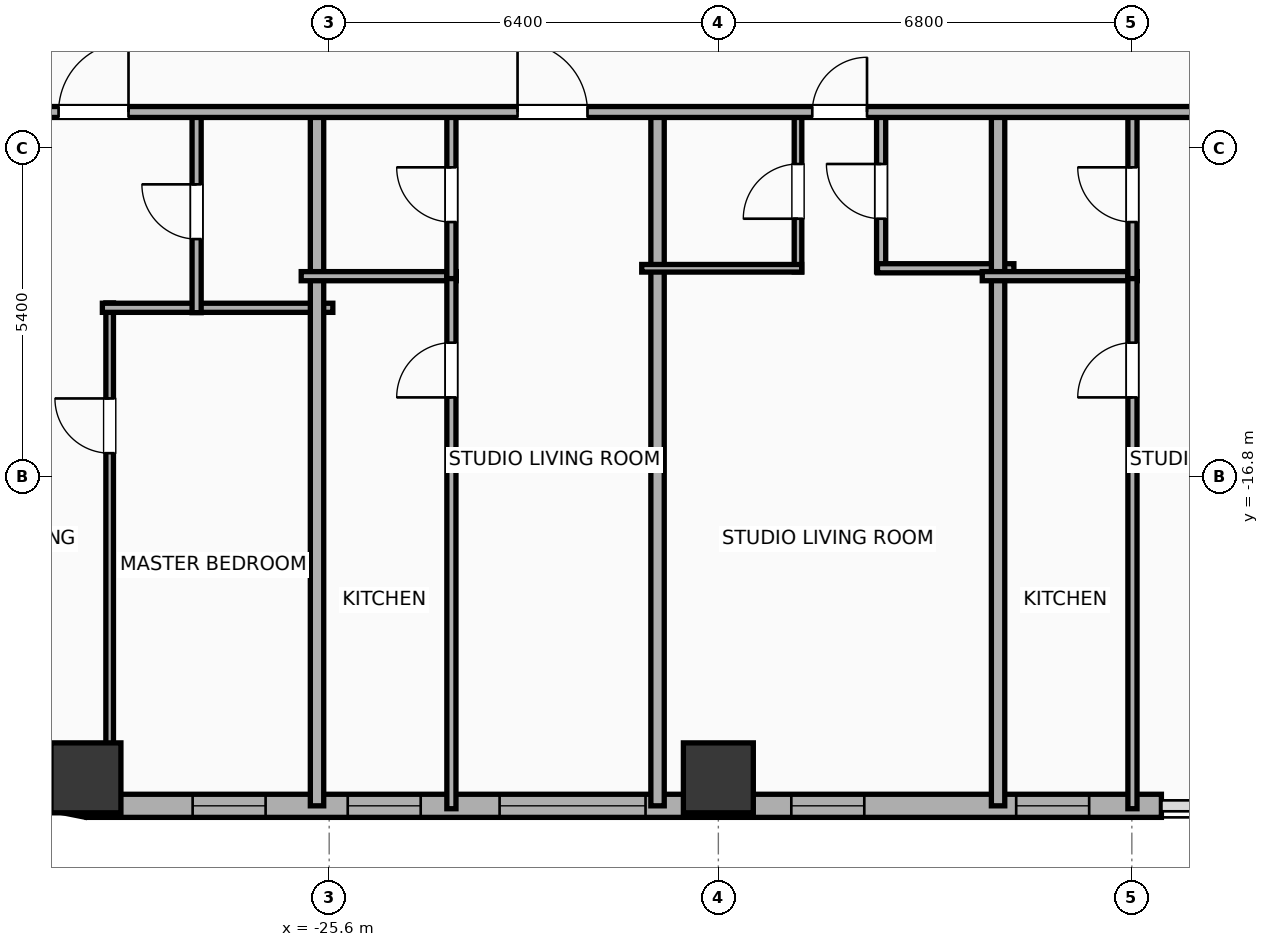
"""IFC4 building model, lengths in metres.
Left out: names, types, materials, properties, quantities, classifications, styles, units other than length and angle.
Written with IfcOpenShell. Run it as: python <this file> out.ifc"""

import sys

from ifc_helpers import new_model, si_unit, direction, frame, frame_2d, origin, origin_2d, place, context, subcontext, project, spatial, rectangle, hollow_rectangle, extrude, element, fill, save


model = new_model("IFC4")
c1 = context("Model", 3, precision=1e-05, world=origin(), true_north=direction((0.0, 1.0)))
c2 = subcontext(c1, "Body", "Model", "MODEL_VIEW")
j1 = project(units=[si_unit("LENGTHUNIT", "METRE"), si_unit("PLANEANGLEUNIT", "RADIAN")], contexts=[c1])
p1 = place(None, origin())
s1 = spatial("IfcSite", under=j1, at=p1, CompositionType="ELEMENT")
p2 = place(p1, origin())
s2 = spatial("IfcBuilding", under=s1, at=p2, CompositionType="ELEMENT")
p3 = place(p2, frame((0.0, 0.0, 61.1)))
s3 = spatial("IfcBuildingStorey", under=s2, at=p3, CompositionType="ELEMENT", Elevation=61.1)
for number, where, z_axis, x_axis in (
    (1, (-29.6, -21.75, 0.0), (0.0, 0.0, 1.0), (1.0, 0.0, 0.0)),
    (2, (-19.2, -21.75, 0.0), (0.0, 0.0, 1.0), (1.0, 0.0, 0.0)),
):
    element("IfcColumn", number, at=place(p3, frame(where, z_axis=z_axis, x_axis=x_axis)), inside=s3, PredefinedType="COLUMN", context=c2, shape_type="SweptSolid", body=[
        extrude(hollow_rectangle(XDim=1.15, YDim=1.15, WallThickness=0.04, at=origin_2d()), origin(), (0.0, 0.0, 1.0), 3.9),
    ])
p4 = place(p3, frame((-11.914, -22.21, 0.0), z_axis=(0.0, 0.0, 1.0), x_axis=(-1.0, 0.0, 0.0)))
e3 = element("IfcWall", 3, at=p4, inside=s3, PredefinedType="ELEMENTEDWALL", context=c2, shape_type="SweptSolid", body=[
    extrude(rectangle(XDim=17.667, YDim=0.38, at=frame_2d((8.833, 0.0))), origin(), (0.0, 0.0, 1.0), 3.65),
])
p5 = place(p4, frame((8.484, 0.0, 0.75)))
e4 = element("IfcOpeningElement", 4, at=p5, cuts=e3, PredefinedType="OPENING", context=c2, shape_type="SweptSolid", body=[
    extrude(rectangle(XDim=2.4, YDim=2.1, at=frame_2d((1.2, 1.05))), frame((0.0, 0.2, 0.0), z_axis=(0.0, -1.0, 0.0), x_axis=(1.0, 0.0, 0.0)), (0.0, 0.0, 1.0), 0.4),
])
p6 = place(p4, frame((14.732, 0.0, 0.75)))
e5 = element("IfcOpeningElement", 5, at=p6, cuts=e3, PredefinedType="OPENING", context=c2, shape_type="SweptSolid", body=[
    extrude(rectangle(XDim=1.2, YDim=2.05, at=frame_2d((0.6, 1.025))), frame((0.0, 0.2, 0.0), z_axis=(0.0, -1.0, 0.0), x_axis=(1.0, 0.0, 0.0)), (0.0, 0.0, 1.0), 0.4),
])
p7 = place(p4, frame((12.181, 0.0, 0.75)))
e6 = element("IfcOpeningElement", 6, at=p7, cuts=e3, PredefinedType="OPENING", context=c2, shape_type="SweptSolid", body=[
    extrude(rectangle(XDim=1.2, YDim=2.05, at=frame_2d((0.6, 1.025))), frame((0.0, 0.2, 0.0), z_axis=(0.0, -1.0, 0.0), x_axis=(1.0, 0.0, 0.0)), (0.0, 0.0, 1.0), 0.4),
])
p8 = place(p4, frame((4.886, 0.0, 0.75)))
e7 = element("IfcOpeningElement", 7, at=p8, cuts=e3, PredefinedType="OPENING", context=c2, shape_type="SweptSolid", body=[
    extrude(rectangle(XDim=1.2, YDim=2.05, at=frame_2d((0.6, 1.025))), frame((0.0, 0.2, 0.0), z_axis=(0.0, -1.0, 0.0), x_axis=(1.0, 0.0, 0.0)), (0.0, 0.0, 1.0), 0.4),
])
p9 = place(p4, frame((1.188, 0.0, 0.75)))
e8 = element("IfcOpeningElement", 8, at=p9, cuts=e3, PredefinedType="OPENING", context=c2, shape_type="SweptSolid", body=[
    extrude(rectangle(XDim=1.2, YDim=2.05, at=frame_2d((0.6, 1.025))), frame((0.0, 0.2, 0.0), z_axis=(0.0, -1.0, 0.0), x_axis=(1.0, 0.0, 0.0)), (0.0, 0.0, 1.0), 0.4),
])
p10 = place(p3, frame((-29.581, -22.21, 0.0), z_axis=(0.0, 0.0, 1.0), x_axis=(-0.980786132421, 0.195086038585, 0.0)))
e9 = element("IfcWall", 9, at=p10, inside=s3, PredefinedType="ELEMENTEDWALL", context=c2, shape_type="SweptSolid", body=[
    extrude(rectangle(XDim=1.504, YDim=0.38, at=frame_2d((0.752, 0.0))), origin(), (0.0, 0.0, 1.0), 3.65),
])
p11 = place(p3, frame((-29.21, -22.36, 0.0), z_axis=(0.0, 0.0, 1.0), x_axis=(0.0, 1.0, 0.0)))
e10 = element("IfcWall", 10, at=p11, inside=s3, PredefinedType="PARTITIONING", context=c2, shape_type="SweptSolid", body=[
    extrude(rectangle(XDim=8.42, YDim=0.125, at=frame_2d((4.21, 0.0))), origin(), (0.0, 0.0, 1.0), 3.65),
])
p12 = place(p11, frame((5.949, 0.0, 0.0)))
e11 = element("IfcOpeningElement", 11, at=p12, cuts=e10, PredefinedType="OPENING", context=c2, shape_type="SweptSolid", body=[
    extrude(rectangle(XDim=0.9, YDim=2.05, at=frame_2d((0.45, 1.025))), frame((0.0, 0.073, 0.0), z_axis=(0.0, -1.0, 0.0), x_axis=(1.0, 0.0, 0.0)), (0.0, 0.0, 1.0), 0.145),
])
p13 = place(p3, frame((-29.33, -14.02, 0.0), z_axis=(0.0, 0.0, 1.0), x_axis=(1.0, 0.0, 0.0)))
e12 = element("IfcWall", 12, at=p13, inside=s3, PredefinedType="PLUMBINGWALL", context=c2, shape_type="SweptSolid", body=[
    extrude(rectangle(XDim=3.79, YDim=0.15, at=frame_2d((1.895, 0.0))), origin(), (0.0, 0.0, 1.0), 3.65),
])
p14 = place(p3, frame((-27.78, -14.1, 0.0), z_axis=(0.0, 0.0, 1.0), x_axis=(0.0, 1.0, 0.0)))
e13 = element("IfcWall", 13, at=p14, inside=s3, PredefinedType="PLUMBINGWALL", context=c2, shape_type="SweptSolid", body=[
    extrude(rectangle(XDim=3.32, YDim=0.15, at=frame_2d((1.66, 0.0))), origin(), (0.0, 0.0, 1.0), 3.65),
])
p15 = place(p14, frame((1.21, 0.0, 0.0)))
e14 = element("IfcOpeningElement", 14, at=p15, cuts=e13, PredefinedType="OPENING", context=c2, shape_type="SweptSolid", body=[
    extrude(rectangle(XDim=0.9, YDim=2.05, at=frame_2d((0.45, 1.025))), frame((0.0, 0.085, 0.0), z_axis=(0.0, -1.0, 0.0), x_axis=(1.0, 0.0, 0.0)), (0.0, 0.0, 1.0), 0.17),
])
p16 = place(p3, frame((-25.8, -22.21, 0.0), z_axis=(0.0, 0.0, 1.0), x_axis=(0.0, 1.0, 0.0)))
e15 = element("IfcWall", 15, at=p16, inside=s3, PredefinedType="PARTITIONING", context=c2, shape_type="SweptSolid", body=[
    extrude(rectangle(XDim=11.49, YDim=0.22, at=frame_2d((5.745, 0.0))), origin(), (0.0, 0.0, 1.0), 3.65),
])
p17 = place(p3, frame((-26.06, -13.5, 0.0), z_axis=(0.0, 0.0, 1.0), x_axis=(1.0, 0.0, 0.0)))
e16 = element("IfcWall", 16, at=p17, inside=s3, PredefinedType="PLUMBINGWALL", context=c2, shape_type="SweptSolid", body=[
    extrude(rectangle(XDim=2.55, YDim=0.15, at=frame_2d((1.275, 0.0))), origin(), (0.0, 0.0, 1.0), 3.65),
])
p18 = place(p3, frame((-23.59, -22.258, 0.0), z_axis=(0.0, 0.0, 1.0), x_axis=(0.0, 1.0, 0.0)))
e17 = element("IfcWall", 17, at=p18, inside=s3, PredefinedType="PLUMBINGWALL", context=c2, shape_type="SweptSolid", body=[
    extrude(rectangle(XDim=8.798, YDim=0.15, at=frame_2d((4.399, 0.0))), origin(), (0.0, 0.0, 1.0), 3.65),
])
p19 = place(p18, frame((6.764, 0.0, 0.0)))
e18 = element("IfcOpeningElement", 18, at=p19, cuts=e17, PredefinedType="OPENING", context=c2, shape_type="SweptSolid", body=[
    extrude(rectangle(XDim=0.9, YDim=2.05, at=frame_2d((0.45, 1.025))), frame((0.0, 0.085, 0.0), z_axis=(0.0, -1.0, 0.0), x_axis=(1.0, 0.0, 0.0)), (0.0, 0.0, 1.0), 0.17),
])
p20 = place(p3, frame((-23.59, -13.54, 0.0), z_axis=(0.0, 0.0, 1.0), x_axis=(0.0, 1.0, 0.0)))
e19 = element("IfcWall", 19, at=p20, inside=s3, PredefinedType="PLUMBINGWALL", context=c2, shape_type="SweptSolid", body=[
    extrude(rectangle(XDim=2.76, YDim=0.15, at=frame_2d((1.38, 0.0))), origin(), (0.0, 0.0, 1.0), 3.65),
])
p21 = place(p20, frame((0.93, 0.0, 0.0)))
e20 = element("IfcOpeningElement", 20, at=p21, cuts=e19, PredefinedType="OPENING", context=c2, shape_type="SweptSolid", body=[
    extrude(rectangle(XDim=0.9, YDim=2.05, at=frame_2d((0.45, 1.025))), frame((0.0, 0.085, 0.0), z_axis=(0.0, -1.0, 0.0), x_axis=(1.0, 0.0, 0.0)), (0.0, 0.0, 1.0), 0.17),
])
p22 = place(p3, frame((-20.2, -22.21, 0.0), z_axis=(0.0, 0.0, 1.0), x_axis=(0.0, 1.0, 0.0)))
e21 = element("IfcWall", 21, at=p22, inside=s3, PredefinedType="PARTITIONING", context=c2, shape_type="SweptSolid", body=[
    extrude(rectangle(XDim=11.49, YDim=0.22, at=frame_2d((5.745, 0.0))), origin(), (0.0, 0.0, 1.0), 3.65),
])
p23 = place(p3, frame((-17.89, -13.43, 0.0), z_axis=(0.0, 0.0, 1.0), x_axis=(0.0, 1.0, 0.0)))
e22 = element("IfcWall", 22, at=p23, inside=s3, PredefinedType="PARTITIONING", context=c2, shape_type="SweptSolid", body=[
    extrude(rectangle(XDim=2.65, YDim=0.125, at=frame_2d((1.325, 0.0))), origin(), (0.0, 0.0, 1.0), 3.65),
])
p24 = place(p23, frame((0.875, 0.0, 0.0)))
e23 = element("IfcOpeningElement", 23, at=p24, cuts=e22, PredefinedType="OPENING", context=c2, shape_type="SweptSolid", body=[
    extrude(rectangle(XDim=0.9, YDim=2.05, at=frame_2d((0.45, 1.025))), frame((0.0, 0.073, 0.0), z_axis=(0.0, -1.0, 0.0), x_axis=(1.0, 0.0, 0.0)), (0.0, 0.0, 1.0), 0.145),
])
p25 = place(p3, frame((-16.523, -13.43, 0.0), z_axis=(0.0, 0.0, 1.0), x_axis=(0.0, 1.0, 0.0)))
e24 = element("IfcWall", 24, at=p25, inside=s3, PredefinedType="PLUMBINGWALL", context=c2, shape_type="SweptSolid", body=[
    extrude(rectangle(XDim=2.65, YDim=0.15, at=frame_2d((1.325, 0.0))), origin(), (0.0, 0.0, 1.0), 3.65),
])
p26 = place(p25, frame((0.875, 0.0, 0.0)))
e25 = element("IfcOpeningElement", 25, at=p26, cuts=e24, PredefinedType="OPENING", context=c2, shape_type="SweptSolid", body=[
    extrude(rectangle(XDim=0.9, YDim=2.05, at=frame_2d((0.45, 1.025))), frame((0.0, 0.085, 0.0), z_axis=(0.0, -1.0, 0.0), x_axis=(1.0, 0.0, 0.0)), (0.0, 0.0, 1.0), 0.17),
])
p27 = place(p3, frame((-20.46, -13.37, 0.0), z_axis=(0.0, 0.0, 1.0), x_axis=(1.0, 0.0, 0.0)))
e26 = element("IfcWall", 26, at=p27, inside=s3, PredefinedType="PARTITIONING", context=c2, shape_type="SweptSolid", body=[
    extrude(rectangle(XDim=2.63, YDim=0.125, at=frame_2d((1.315, 0.0))), origin(), (0.0, 0.0, 1.0), 3.65),
])
p28 = place(p3, frame((-16.583, -13.37, 0.0), z_axis=(0.0, 0.0, 1.0), x_axis=(1.0, 0.0, 0.0)))
e27 = element("IfcWall", 27, at=p28, inside=s3, PredefinedType="PLUMBINGWALL", context=c2, shape_type="SweptSolid", body=[
    extrude(rectangle(XDim=2.243, YDim=0.15, at=frame_2d((1.122, 0.0))), origin(), (0.0, 0.0, 1.0), 3.65),
])
p29 = place(p3, frame((-14.6, -22.21, 0.0), z_axis=(0.0, 0.0, 1.0), x_axis=(0.0, 1.0, 0.0)))
e28 = element("IfcWall", 28, at=p29, inside=s3, PredefinedType="PARTITIONING", context=c2, shape_type="SweptSolid", body=[
    extrude(rectangle(XDim=11.49, YDim=0.22, at=frame_2d((5.745, 0.0))), origin(), (0.0, 0.0, 1.0), 3.65),
])
p30 = place(p3, frame((-14.86, -13.5, 0.0), z_axis=(0.0, 0.0, 1.0), x_axis=(1.0, 0.0, 0.0)))
e29 = element("IfcWall", 29, at=p30, inside=s3, PredefinedType="PLUMBINGWALL", context=c2, shape_type="SweptSolid", body=[
    extrude(rectangle(XDim=2.55, YDim=0.15, at=frame_2d((1.275, 0.0))), origin(), (0.0, 0.0, 1.0), 3.65),
])
p31 = place(p3, frame((-12.39, -22.258, 0.0), z_axis=(0.0, 0.0, 1.0), x_axis=(0.0, 1.0, 0.0)))
e30 = element("IfcWall", 30, at=p31, inside=s3, PredefinedType="PLUMBINGWALL", context=c2, shape_type="SweptSolid", body=[
    extrude(rectangle(XDim=8.798, YDim=0.15, at=frame_2d((4.399, 0.0))), origin(), (0.0, 0.0, 1.0), 3.65),
])
p32 = place(p31, frame((6.764, 0.0, 0.0)))
e31 = element("IfcOpeningElement", 31, at=p32, cuts=e30, PredefinedType="OPENING", context=c2, shape_type="SweptSolid", body=[
    extrude(rectangle(XDim=0.9, YDim=2.05, at=frame_2d((0.45, 1.025))), frame((0.0, 0.085, 0.0), z_axis=(0.0, -1.0, 0.0), x_axis=(1.0, 0.0, 0.0)), (0.0, 0.0, 1.0), 0.17),
])
p33 = place(p3, frame((-12.39, -13.54, 0.0), z_axis=(0.0, 0.0, 1.0), x_axis=(0.0, 1.0, 0.0)))
e32 = element("IfcWall", 32, at=p33, inside=s3, PredefinedType="PLUMBINGWALL", context=c2, shape_type="SweptSolid", body=[
    extrude(rectangle(XDim=2.76, YDim=0.15, at=frame_2d((1.38, 0.0))), origin(), (0.0, 0.0, 1.0), 3.65),
])
p34 = place(p33, frame((0.93, 0.0, 0.0)))
e33 = element("IfcOpeningElement", 33, at=p34, cuts=e32, PredefinedType="OPENING", context=c2, shape_type="SweptSolid", body=[
    extrude(rectangle(XDim=0.9, YDim=2.05, at=frame_2d((0.45, 1.025))), frame((0.0, 0.085, 0.0), z_axis=(0.0, -1.0, 0.0), x_axis=(1.0, 0.0, 0.0)), (0.0, 0.0, 1.0), 0.17),
])
p35 = place(p3, frame((-33.41, -10.8, 0.0), z_axis=(0.0, 0.0, 1.0), x_axis=(1.0, 0.0, 0.0)))
e34 = element("IfcWall", 34, at=p35, inside=s3, PredefinedType="PARTITIONING", context=c2, shape_type="SweptSolid", body=[
    extrude(rectangle(XDim=59.62, YDim=0.18, at=frame_2d((29.81, 0.0))), origin(), (0.0, 0.0, 1.0), 3.65),
])
p36 = place(p35, frame((3.36, 0.0, 0.0)))
e35 = element("IfcOpeningElement", 35, at=p36, cuts=e34, PredefinedType="OPENING", context=c2, shape_type="SweptSolid", body=[
    extrude(rectangle(XDim=1.15, YDim=2.05, at=frame_2d((0.575, 1.025))), frame((0.0, 0.1, 0.0), z_axis=(0.0, -1.0, 0.0), x_axis=(1.0, 0.0, 0.0)), (0.0, 0.0, 1.0), 0.2),
])
p37 = place(p35, frame((10.908, 0.0, 0.0)))
e36 = element("IfcOpeningElement", 36, at=p37, cuts=e34, PredefinedType="OPENING", context=c2, shape_type="SweptSolid", body=[
    extrude(rectangle(XDim=1.15, YDim=2.05, at=frame_2d((0.575, 1.025))), frame((0.0, 0.1, 0.0), z_axis=(0.0, -1.0, 0.0), x_axis=(1.0, 0.0, 0.0)), (0.0, 0.0, 1.0), 0.2),
])
p38 = place(p35, frame((15.755, 0.0, 0.0)))
e37 = element("IfcOpeningElement", 37, at=p38, cuts=e34, PredefinedType="OPENING", context=c2, shape_type="SweptSolid", body=[
    extrude(rectangle(XDim=0.9, YDim=2.05, at=frame_2d((0.45, 1.025))), frame((0.0, 0.1, 0.0), z_axis=(0.0, -1.0, 0.0), x_axis=(1.0, 0.0, 0.0)), (0.0, 0.0, 1.0), 0.2),
])
p39 = place(p35, frame((22.11, 0.0, 0.0)))
e38 = element("IfcOpeningElement", 38, at=p39, cuts=e34, PredefinedType="OPENING", context=c2, shape_type="SweptSolid", body=[
    extrude(rectangle(XDim=1.15, YDim=2.05, at=frame_2d((0.575, 1.025))), frame((0.0, 0.1, 0.0), z_axis=(0.0, -1.0, 0.0), x_axis=(1.0, 0.0, 0.0)), (0.0, 0.0, 1.0), 0.2),
])
p40 = place(p35, frame((27.709, 0.0, 0.0)))
e39 = element("IfcOpeningElement", 39, at=p40, cuts=e34, PredefinedType="OPENING", context=c2, shape_type="SweptSolid", body=[
    extrude(rectangle(XDim=1.15, YDim=2.05, at=frame_2d((0.575, 1.025))), frame((0.0, 0.1, 0.0), z_axis=(0.0, -1.0, 0.0), x_axis=(1.0, 0.0, 0.0)), (0.0, 0.0, 1.0), 0.2),
])
p41 = place(p35, frame((33.349, 0.0, 0.0)))
e40 = element("IfcOpeningElement", 40, at=p41, cuts=e34, PredefinedType="OPENING", context=c2, shape_type="SweptSolid", body=[
    extrude(rectangle(XDim=1.15, YDim=2.05, at=frame_2d((0.575, 1.025))), frame((0.0, 0.1, 0.0), z_axis=(0.0, -1.0, 0.0), x_axis=(1.0, 0.0, 0.0)), (0.0, 0.0, 1.0), 0.2),
])
p42 = place(p35, frame((36.759, 0.0, 0.0)))
e41 = element("IfcOpeningElement", 41, at=p42, cuts=e34, PredefinedType="OPENING", context=c2, shape_type="SweptSolid", body=[
    extrude(rectangle(XDim=1.15, YDim=2.05, at=frame_2d((0.575, 1.025))), frame((0.0, 0.1, 0.0), z_axis=(0.0, -1.0, 0.0), x_axis=(1.0, 0.0, 0.0)), (0.0, 0.0, 1.0), 0.2),
])
p43 = place(p35, frame((43.752, 0.0, 0.0)))
e42 = element("IfcOpeningElement", 42, at=p43, cuts=e34, PredefinedType="OPENING", context=c2, shape_type="SweptSolid", body=[
    extrude(rectangle(XDim=0.9, YDim=2.05, at=frame_2d((0.45, 1.025))), frame((0.0, 0.1, 0.0), z_axis=(0.0, -1.0, 0.0), x_axis=(1.0, 0.0, 0.0)), (0.0, 0.0, 1.0), 0.2),
])
p44 = place(p35, frame((47.962, 0.0, 0.0)))
e43 = element("IfcOpeningElement", 43, at=p44, cuts=e34, PredefinedType="OPENING", context=c2, shape_type="SweptSolid", body=[
    extrude(rectangle(XDim=1.15, YDim=2.05, at=frame_2d((0.575, 1.025))), frame((0.0, 0.1, 0.0), z_axis=(0.0, -1.0, 0.0), x_axis=(1.0, 0.0, 0.0)), (0.0, 0.0, 1.0), 0.2),
])
p45 = place(p35, frame((55.641, 0.0, 0.0)))
e44 = element("IfcOpeningElement", 44, at=p45, cuts=e34, PredefinedType="OPENING", context=c2, shape_type="SweptSolid", body=[
    extrude(rectangle(XDim=1.15, YDim=2.05, at=frame_2d((0.575, 1.025))), frame((0.0, 0.1, 0.0), z_axis=(0.0, -1.0, 0.0), x_axis=(1.0, 0.0, 0.0)), (0.0, 0.0, 1.0), 0.2),
])
p46 = place(p5, origin())
e45 = element("IfcWindow", 45, at=p46, inside=s3, PartitioningType="SINGLE_PANEL", PredefinedType="WINDOW", context=c2, shape_type="SweptSolid", body=[
    extrude(rectangle(XDim=2.4, YDim=2.1, at=frame_2d((1.2, 1.05))), frame((0.0, 0.03, 0.0), z_axis=(0.0, -1.0, 0.0), x_axis=(1.0, 0.0, 0.0)), (0.0, 0.0, 1.0), 0.06),
])
fill(e4, e45)
p47 = place(p6, origin())
e46 = element("IfcWindow", 46, at=p47, inside=s3, PartitioningType="SINGLE_PANEL", PredefinedType="WINDOW", context=c2, shape_type="SweptSolid", body=[
    extrude(rectangle(XDim=1.2, YDim=2.05, at=frame_2d((0.6, 1.025))), frame((0.0, 0.03, 0.0), z_axis=(0.0, -1.0, 0.0), x_axis=(1.0, 0.0, 0.0)), (0.0, 0.0, 1.0), 0.06),
])
fill(e5, e46)
p48 = place(p7, origin())
e47 = element("IfcWindow", 47, at=p48, inside=s3, PartitioningType="SINGLE_PANEL", PredefinedType="WINDOW", context=c2, shape_type="SweptSolid", body=[
    extrude(rectangle(XDim=1.2, YDim=2.05, at=frame_2d((0.6, 1.025))), frame((0.0, 0.03, 0.0), z_axis=(0.0, -1.0, 0.0), x_axis=(1.0, 0.0, 0.0)), (0.0, 0.0, 1.0), 0.06),
])
fill(e6, e47)
p49 = place(p8, origin())
e48 = element("IfcWindow", 48, at=p49, inside=s3, PartitioningType="SINGLE_PANEL", PredefinedType="WINDOW", context=c2, shape_type="SweptSolid", body=[
    extrude(rectangle(XDim=1.2, YDim=2.05, at=frame_2d((0.6, 1.025))), frame((0.0, 0.03, 0.0), z_axis=(0.0, -1.0, 0.0), x_axis=(1.0, 0.0, 0.0)), (0.0, 0.0, 1.0), 0.06),
])
fill(e7, e48)
p50 = place(p9, origin())
e49 = element("IfcWindow", 49, at=p50, inside=s3, PartitioningType="SINGLE_PANEL", PredefinedType="WINDOW", context=c2, shape_type="SweptSolid", body=[
    extrude(rectangle(XDim=1.2, YDim=2.05, at=frame_2d((0.6, 1.025))), frame((0.0, 0.03, 0.0), z_axis=(0.0, -1.0, 0.0), x_axis=(1.0, 0.0, 0.0)), (0.0, 0.0, 1.0), 0.06),
])
fill(e8, e49)
p51 = place(p12, origin())
e50 = element("IfcDoor", 50, at=p51, inside=s3, OperationType="SINGLE_SWING_RIGHT", PredefinedType="DOOR", context=c2, shape_type="SweptSolid", body=[
    extrude(rectangle(XDim=0.9, YDim=2.05, at=frame_2d((0.45, 1.025))), frame((0.0, 0.025, 0.0), z_axis=(0.0, -1.0, 0.0), x_axis=(1.0, 0.0, 0.0)), (0.0, 0.0, 1.0), 0.05),
])
fill(e11, e50)
p52 = place(p15, origin())
e51 = element("IfcDoor", 51, at=p52, inside=s3, OperationType="SINGLE_SWING_RIGHT", PredefinedType="DOOR", context=c2, shape_type="SweptSolid", body=[
    extrude(rectangle(XDim=0.9, YDim=2.05, at=frame_2d((0.45, 1.025))), frame((0.0, 0.025, 0.0), z_axis=(0.0, -1.0, 0.0), x_axis=(1.0, 0.0, 0.0)), (0.0, 0.0, 1.0), 0.05),
])
fill(e14, e51)
p53 = place(p19, origin())
e52 = element("IfcDoor", 52, at=p53, inside=s3, OperationType="SINGLE_SWING_LEFT", PredefinedType="DOOR", context=c2, shape_type="SweptSolid", body=[
    extrude(rectangle(XDim=0.9, YDim=2.05, at=frame_2d((0.45, 1.025))), frame((0.0, 0.025, 0.0), z_axis=(0.0, -1.0, 0.0), x_axis=(1.0, 0.0, 0.0)), (0.0, 0.0, 1.0), 0.05),
])
fill(e18, e52)
p54 = place(p21, origin())
e53 = element("IfcDoor", 53, at=p54, inside=s3, OperationType="SINGLE_SWING_RIGHT", PredefinedType="DOOR", context=c2, shape_type="SweptSolid", body=[
    extrude(rectangle(XDim=0.9, YDim=2.05, at=frame_2d((0.45, 1.025))), frame((0.0, 0.025, 0.0), z_axis=(0.0, -1.0, 0.0), x_axis=(1.0, 0.0, 0.0)), (0.0, 0.0, 1.0), 0.05),
])
fill(e20, e53)
p55 = place(p24, origin())
e54 = element("IfcDoor", 54, at=p55, inside=s3, OperationType="SINGLE_SWING_LEFT", PredefinedType="DOOR", context=c2, shape_type="SweptSolid", body=[
    extrude(rectangle(XDim=0.9, YDim=2.05, at=frame_2d((0.45, 1.025))), frame((0.0, 0.025, 0.0), z_axis=(0.0, -1.0, 0.0), x_axis=(1.0, 0.0, 0.0)), (0.0, 0.0, 1.0), 0.05),
])
fill(e23, e54)
p56 = place(p26, origin())
e55 = element("IfcDoor", 55, at=p56, inside=s3, OperationType="SINGLE_SWING_RIGHT", PredefinedType="DOOR", context=c2, shape_type="SweptSolid", body=[
    extrude(rectangle(XDim=0.9, YDim=2.05, at=frame_2d((0.45, 1.025))), frame((0.0, 0.025, 0.0), z_axis=(0.0, -1.0, 0.0), x_axis=(1.0, 0.0, 0.0)), (0.0, 0.0, 1.0), 0.05),
])
fill(e25, e55)
p57 = place(p32, origin())
e56 = element("IfcDoor", 56, at=p57, inside=s3, OperationType="SINGLE_SWING_LEFT", PredefinedType="DOOR", context=c2, shape_type="SweptSolid", body=[
    extrude(rectangle(XDim=0.9, YDim=2.05, at=frame_2d((0.45, 1.025))), frame((0.0, 0.025, 0.0), z_axis=(0.0, -1.0, 0.0), x_axis=(1.0, 0.0, 0.0)), (0.0, 0.0, 1.0), 0.05),
])
fill(e31, e56)
p58 = place(p34, origin())
e57 = element("IfcDoor", 57, at=p58, inside=s3, OperationType="SINGLE_SWING_RIGHT", PredefinedType="DOOR", context=c2, shape_type="SweptSolid", body=[
    extrude(rectangle(XDim=0.9, YDim=2.05, at=frame_2d((0.45, 1.025))), frame((0.0, 0.025, 0.0), z_axis=(0.0, -1.0, 0.0), x_axis=(1.0, 0.0, 0.0)), (0.0, 0.0, 1.0), 0.05),
])
fill(e33, e57)
p59 = place(p36, origin())
e58 = element("IfcDoor", 58, at=p59, inside=s3, OperationType="SINGLE_SWING_RIGHT", PredefinedType="DOOR", context=c2, shape_type="SweptSolid", body=[
    extrude(rectangle(XDim=1.15, YDim=2.05, at=frame_2d((0.575, 1.025))), frame((0.0, 0.025, 0.0), z_axis=(0.0, -1.0, 0.0), x_axis=(1.0, 0.0, 0.0)), (0.0, 0.0, 1.0), 0.05),
])
fill(e35, e58)
p60 = place(p37, origin())
e59 = element("IfcDoor", 59, at=p60, inside=s3, OperationType="SINGLE_SWING_LEFT", PredefinedType="DOOR", context=c2, shape_type="SweptSolid", body=[
    extrude(rectangle(XDim=1.15, YDim=2.05, at=frame_2d((0.575, 1.025))), frame((0.0, 0.025, 0.0), z_axis=(0.0, -1.0, 0.0), x_axis=(1.0, 0.0, 0.0)), (0.0, 0.0, 1.0), 0.05),
])
fill(e36, e59)
p61 = place(p38, origin())
e60 = element("IfcDoor", 60, at=p61, inside=s3, OperationType="SINGLE_SWING_RIGHT", PredefinedType="DOOR", context=c2, shape_type="SweptSolid", body=[
    extrude(rectangle(XDim=0.9, YDim=2.05, at=frame_2d((0.45, 1.025))), frame((0.0, 0.025, 0.0), z_axis=(0.0, -1.0, 0.0), x_axis=(1.0, 0.0, 0.0)), (0.0, 0.0, 1.0), 0.05),
])
fill(e37, e60)
save(model, sys.argv[1])
